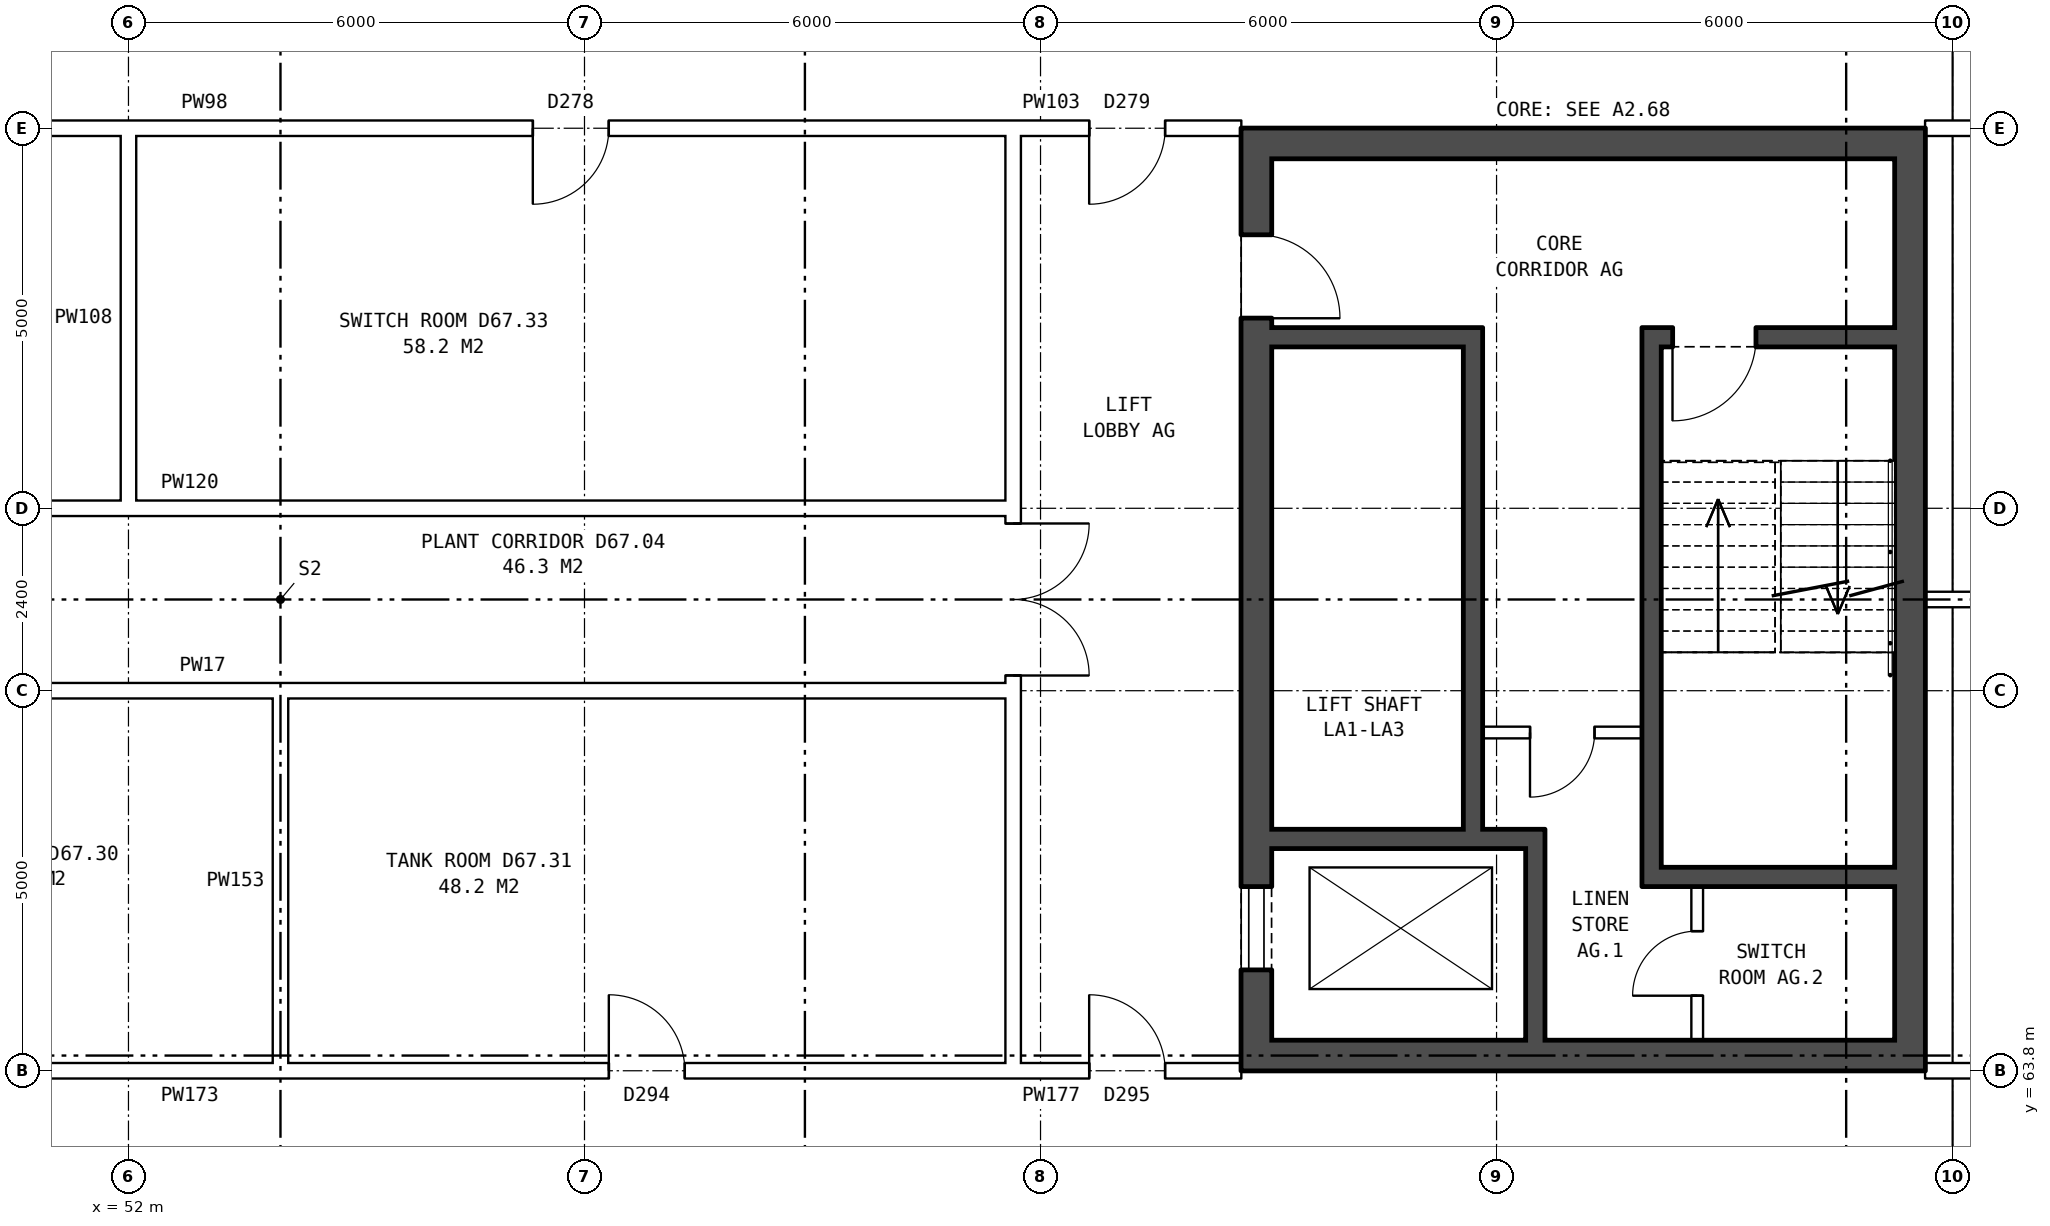
"""IFC4 building model, lengths in metres.
Left out: names, types, materials, properties, quantities, classifications, styles, units other than length and angle.
Written with IfcOpenShell. Run it as: python <this file> out.ifc"""

import sys

from ifc_helpers import new_model, si_unit, direction, frame, frame_2d, origin, place, context, subcontext, project, spatial, rectangle, extrude, element, fill, save


model = new_model("IFC4")
c1 = context("Model", 3, precision=1e-05, world=origin(), true_north=direction((0.0, 1.0)))
c2 = subcontext(c1, "Body", "Model", "MODEL_VIEW")
j1 = project(units=[si_unit("LENGTHUNIT", "METRE"), si_unit("PLANEANGLEUNIT", "RADIAN")], contexts=[c1])
p1 = place(None, origin())
s1 = spatial("IfcSite", under=j1, at=p1, CompositionType="ELEMENT")
p2 = place(p1, origin())
s2 = spatial("IfcBuilding", under=s1, at=p2, CompositionType="ELEMENT")
p3 = place(p2, frame((0.0, 0.0, 236.9)))
s3 = spatial("IfcBuildingStorey", under=s2, at=p3, CompositionType="ELEMENT", Elevation=236.9)
p4 = place(p3, frame((66.84, 63.8, 0.0), z_axis=(0.0, 0.0, 1.0), x_axis=(0.0, 1.0, 0.0)))
e1 = element("IfcWall", 1, at=p4, inside=s3, PredefinedType="SHEAR", context=c2, shape_type="SweptSolid", body=[
    extrude(rectangle(XDim=12.4, YDim=0.4, at=frame_2d((6.2, 0.0))), origin(), (0.0, 0.0, 1.0), 6.7),
])
p5 = place(p4, frame((1.325, 0.0, 0.0)))
e2 = element("IfcOpeningElement", 2, at=p5, cuts=e1, PredefinedType="OPENING", context=c2, shape_type="SweptSolid", body=[
    extrude(rectangle(XDim=1.1, YDim=2.1, at=frame_2d((0.55, 1.05))), frame((0.0, 0.21, 0.0), z_axis=(0.0, -1.0, 0.0), x_axis=(1.0, 0.0, 0.0)), (0.0, 0.0, 1.0), 0.42),
])
p6 = place(p4, frame((9.9, 0.0, 0.0)))
e3 = element("IfcOpeningElement", 3, at=p6, cuts=e1, PredefinedType="OPENING", context=c2, shape_type="SweptSolid", body=[
    extrude(rectangle(XDim=1.1, YDim=2.1, at=frame_2d((0.55, 1.05))), frame((0.0, 0.21, 0.0), z_axis=(0.0, -1.0, 0.0), x_axis=(1.0, 0.0, 0.0)), (0.0, 0.0, 1.0), 0.42),
])
p7 = place(p3, frame((75.44, 63.8, 0.0), z_axis=(0.0, 0.0, 1.0), x_axis=(0.0, 1.0, 0.0)))
e4 = element("IfcWall", 4, at=p7, inside=s3, PredefinedType="SHEAR", context=c2, shape_type="SweptSolid", body=[
    extrude(rectangle(XDim=12.4, YDim=0.4, at=frame_2d((6.2, 0.0))), origin(), (0.0, 0.0, 1.0), 6.7),
])
for number, where, z_axis, x_axis in (
    (5, (67.04, 64.0, 0.0), (0.0, 0.0, 1.0), (1.0, 0.0, 0.0)),
    (6, (67.04, 76.0, 0.0), (0.0, 0.0, 1.0), (1.0, 0.0, 0.0)),
):
    element("IfcWall", number, at=place(p3, frame(where, z_axis=z_axis, x_axis=x_axis)), inside=s3, PredefinedType="SHEAR", context=c2, shape_type="SweptSolid", body=[
        extrude(rectangle(XDim=8.2, YDim=0.4, at=frame_2d((4.1, 0.0))), origin(), (0.0, 0.0, 1.0), 6.7),
    ])
p8 = place(p3, frame((72.165, 66.35, 0.0), z_axis=(0.0, 0.0, 1.0), x_axis=(1.0, 0.0, 0.0)))
e7 = element("IfcWall", 7, at=p8, inside=s3, PredefinedType="SHEAR", context=c2, shape_type="SweptSolid", body=[
    extrude(rectangle(XDim=3.075, YDim=0.25, at=frame_2d((1.538, 0.0))), origin(), (0.0, 0.0, 1.0), 6.7),
])
p9 = place(p3, frame((67.04, 66.85, 0.0), z_axis=(0.0, 0.0, 1.0), x_axis=(1.0, 0.0, 0.0)))
e8 = element("IfcWall", 8, at=p9, inside=s3, PredefinedType="SHEAR", context=c2, shape_type="SweptSolid", body=[
    extrude(rectangle(XDim=3.595, YDim=0.25, at=frame_2d((1.797, 0.0))), origin(), (0.0, 0.0, 1.0), 6.7),
])
p10 = place(p3, frame((69.815, 68.25, 0.0), z_axis=(0.0, 0.0, 1.0), x_axis=(1.0, 0.0, 0.0)))
e9 = element("IfcWall", 9, at=p10, inside=s3, PredefinedType="PARTITIONING", context=c2, shape_type="SweptSolid", body=[
    extrude(rectangle(XDim=2.1, YDim=0.15, at=frame_2d((1.05, 0.0))), origin(), (0.0, 0.0, 1.0), 6.7),
])
p11 = place(p10, frame((0.625, 0.0, 0.0)))
e10 = element("IfcOpeningElement", 10, at=p11, cuts=e9, PredefinedType="OPENING", context=c2, shape_type="SweptSolid", body=[
    extrude(rectangle(XDim=0.85, YDim=2.1, at=frame_2d((0.425, 1.05))), frame((0.0, 0.085, 0.0), z_axis=(0.0, -1.0, 0.0), x_axis=(1.0, 0.0, 0.0)), (0.0, 0.0, 1.0), 0.17),
])
p12 = place(p3, frame((67.04, 73.45, 0.0), z_axis=(0.0, 0.0, 1.0), x_axis=(1.0, 0.0, 0.0)))
e11 = element("IfcWall", 11, at=p12, inside=s3, PredefinedType="SHEAR", context=c2, shape_type="SweptSolid", body=[
    extrude(rectangle(XDim=2.525, YDim=0.25, at=frame_2d((1.262, 0.0))), origin(), (0.0, 0.0, 1.0), 6.7),
])
p13 = place(p3, frame((72.165, 73.45, 0.0), z_axis=(0.0, 0.0, 1.0), x_axis=(1.0, 0.0, 0.0)))
e12 = element("IfcWall", 12, at=p13, inside=s3, PredefinedType="SHEAR", context=c2, shape_type="SweptSolid", body=[
    extrude(rectangle(XDim=3.075, YDim=0.25, at=frame_2d((1.538, 0.0))), origin(), (0.0, 0.0, 1.0), 6.7),
])
p14 = place(p13, frame((0.15, 0.0, 0.0)))
e13 = element("IfcOpeningElement", 13, at=p14, cuts=e12, PredefinedType="OPENING", context=c2, shape_type="SweptSolid", body=[
    extrude(rectangle(XDim=1.1, YDim=2.1, at=frame_2d((0.55, 1.05))), frame((0.0, 0.135, 0.0), z_axis=(0.0, -1.0, 0.0), x_axis=(1.0, 0.0, 0.0)), (0.0, 0.0, 1.0), 0.27),
])
p15 = place(p3, frame((69.69, 66.975, 0.0), z_axis=(0.0, 0.0, 1.0), x_axis=(0.0, 1.0, 0.0)))
e14 = element("IfcWall", 14, at=p15, inside=s3, PredefinedType="SHEAR", context=c2, shape_type="SweptSolid", body=[
    extrude(rectangle(XDim=6.6, YDim=0.25, at=frame_2d((3.3, 0.0))), origin(), (0.0, 0.0, 1.0), 6.7),
])
p16 = place(p3, frame((70.51, 64.2, 0.0), z_axis=(0.0, 0.0, 1.0), x_axis=(0.0, 1.0, 0.0)))
e15 = element("IfcWall", 15, at=p16, inside=s3, PredefinedType="SHEAR", context=c2, shape_type="SweptSolid", body=[
    extrude(rectangle(XDim=2.525, YDim=0.25, at=frame_2d((1.263, 0.0))), origin(), (0.0, 0.0, 1.0), 6.7),
])
p17 = place(p3, frame((72.04, 66.225, 0.0), z_axis=(0.0, 0.0, 1.0), x_axis=(0.0, 1.0, 0.0)))
e16 = element("IfcWall", 16, at=p17, inside=s3, PredefinedType="SHEAR", context=c2, shape_type="SweptSolid", body=[
    extrude(rectangle(XDim=7.35, YDim=0.25, at=frame_2d((3.675, 0.0))), origin(), (0.0, 0.0, 1.0), 6.7),
])
p18 = place(p3, frame((72.64, 64.2, 0.0), z_axis=(0.0, 0.0, 1.0), x_axis=(0.0, 1.0, 0.0)))
e17 = element("IfcWall", 17, at=p18, inside=s3, PredefinedType="PARTITIONING", context=c2, shape_type="SweptSolid", body=[
    extrude(rectangle(XDim=2.025, YDim=0.15, at=frame_2d((1.013, 0.0))), origin(), (0.0, 0.0, 1.0), 6.7),
])
p19 = place(p18, frame((0.587, 0.0, 0.0)))
e18 = element("IfcOpeningElement", 18, at=p19, cuts=e17, PredefinedType="OPENING", context=c2, shape_type="SweptSolid", body=[
    extrude(rectangle(XDim=0.85, YDim=2.1, at=frame_2d((0.425, 1.05))), frame((0.0, 0.085, 0.0), z_axis=(0.0, -1.0, 0.0), x_axis=(1.0, 0.0, 0.0)), (0.0, 0.0, 1.0), 0.17),
])
p20 = place(p3, frame((63.64, 63.9, 0.0), z_axis=(0.0, 0.0, 1.0), x_axis=(0.0, 1.0, 0.0)))
e19 = element("IfcWall", 19, at=p20, inside=s3, PredefinedType="PARTITIONING", context=c2, shape_type="SweptSolid", body=[
    extrude(rectangle(XDim=12.2, YDim=0.2, at=frame_2d((6.1, 0.0))), origin(), (0.0, 0.0, 1.0), 6.7),
])
p21 = place(p20, frame((5.1, 0.0, 0.0)))
e20 = element("IfcOpeningElement", 20, at=p21, cuts=e19, PredefinedType="OPENING", context=c2, shape_type="SweptSolid", body=[
    extrude(rectangle(XDim=2.0, YDim=2.1, at=frame_2d((1.0, 1.05))), frame((0.0, 0.11, 0.0), z_axis=(0.0, -1.0, 0.0), x_axis=(1.0, 0.0, 0.0)), (0.0, 0.0, 1.0), 0.22),
])
p22 = place(p3, frame((44.36, 63.8, 0.0), z_axis=(0.0, 0.0, 1.0), x_axis=(1.0, 0.0, 0.0)))
e21 = element("IfcWall", 21, at=p22, inside=s3, PredefinedType="PARTITIONING", context=c2, shape_type="SweptSolid", body=[
    extrude(rectangle(XDim=19.28, YDim=0.2, at=frame_2d((9.64, 0.0))), origin(), (0.0, 0.0, 1.0), 6.7),
])
p23 = place(p22, frame((4.32, 0.0, 0.0)))
e22 = element("IfcOpeningElement", 22, at=p23, cuts=e21, PredefinedType="OPENING", context=c2, shape_type="SweptSolid", body=[
    extrude(rectangle(XDim=1.0, YDim=2.1, at=frame_2d((0.5, 1.05))), frame((0.0, 0.11, 0.0), z_axis=(0.0, -1.0, 0.0), x_axis=(1.0, 0.0, 0.0)), (0.0, 0.0, 1.0), 0.22),
])
p24 = place(p22, frame((13.96, 0.0, 0.0)))
e23 = element("IfcOpeningElement", 23, at=p24, cuts=e21, PredefinedType="OPENING", context=c2, shape_type="SweptSolid", body=[
    extrude(rectangle(XDim=1.0, YDim=2.1, at=frame_2d((0.5, 1.05))), frame((0.0, 0.11, 0.0), z_axis=(0.0, -1.0, 0.0), x_axis=(1.0, 0.0, 0.0)), (0.0, 0.0, 1.0), 0.22),
])
p25 = place(p3, frame((75.64, 63.8, 0.0), z_axis=(0.0, 0.0, 1.0), x_axis=(1.0, 0.0, 0.0)))
e24 = element("IfcWall", 24, at=p25, inside=s3, PredefinedType="PARTITIONING", context=c2, shape_type="SweptSolid", body=[
    extrude(rectangle(XDim=21.085, YDim=0.2, at=frame_2d((10.542, 0.0))), origin(), (0.0, 0.0, 1.0), 6.7),
])
p26 = place(p25, frame((9.992, 0.0, 0.0)))
e25 = element("IfcOpeningElement", 25, at=p26, cuts=e24, PredefinedType="OPENING", context=c2, shape_type="SweptSolid", body=[
    extrude(rectangle(XDim=1.0, YDim=2.1, at=frame_2d((0.5, 1.05))), frame((0.0, 0.11, 0.0), z_axis=(0.0, -1.0, 0.0), x_axis=(1.0, 0.0, 0.0)), (0.0, 0.0, 1.0), 0.22),
])
p27 = place(p3, frame((63.64, 63.8, 0.0), z_axis=(0.0, 0.0, 1.0), x_axis=(1.0, 0.0, 0.0)))
e26 = element("IfcWall", 26, at=p27, inside=s3, PredefinedType="PARTITIONING", context=c2, shape_type="SweptSolid", body=[
    extrude(rectangle(XDim=3.0, YDim=0.2, at=frame_2d((1.5, 0.0))), origin(), (0.0, 0.0, 1.0), 6.7),
])
p28 = place(p27, frame((1.0, 0.0, 0.0)))
e27 = element("IfcOpeningElement", 27, at=p28, cuts=e26, PredefinedType="OPENING", context=c2, shape_type="SweptSolid", body=[
    extrude(rectangle(XDim=1.0, YDim=2.1, at=frame_2d((0.5, 1.05))), frame((0.0, 0.11, 0.0), z_axis=(0.0, -1.0, 0.0), x_axis=(1.0, 0.0, 0.0)), (0.0, 0.0, 1.0), 0.22),
])
p29 = place(p3, frame((44.36, 68.8, 0.0), z_axis=(0.0, 0.0, 1.0), x_axis=(1.0, 0.0, 0.0)))
e28 = element("IfcWall", 28, at=p29, inside=s3, PredefinedType="PARTITIONING", context=c2, shape_type="SweptSolid", body=[
    extrude(rectangle(XDim=19.28, YDim=0.2, at=frame_2d((9.64, 0.0))), origin(), (0.0, 0.0, 1.0), 6.7),
])
p30 = place(p3, frame((75.64, 70.0, 0.0), z_axis=(0.0, 0.0, 1.0), x_axis=(1.0, 0.0, 0.0)))
e29 = element("IfcWall", 29, at=p30, inside=s3, PredefinedType="PARTITIONING", context=c2, shape_type="SweptSolid", body=[
    extrude(rectangle(XDim=21.085, YDim=0.2, at=frame_2d((10.542, 0.0))), origin(), (0.0, 0.0, 1.0), 6.7),
])
p31 = place(p3, frame((44.36, 71.2, 0.0), z_axis=(0.0, 0.0, 1.0), x_axis=(1.0, 0.0, 0.0)))
e30 = element("IfcWall", 30, at=p31, inside=s3, PredefinedType="PARTITIONING", context=c2, shape_type="SweptSolid", body=[
    extrude(rectangle(XDim=19.28, YDim=0.2, at=frame_2d((9.64, 0.0))), origin(), (0.0, 0.0, 1.0), 6.7),
])
p32 = place(p3, frame((44.36, 76.2, 0.0), z_axis=(0.0, 0.0, 1.0), x_axis=(1.0, 0.0, 0.0)))
e31 = element("IfcWall", 31, at=p32, inside=s3, PredefinedType="PARTITIONING", context=c2, shape_type="SweptSolid", body=[
    extrude(rectangle(XDim=19.28, YDim=0.2, at=frame_2d((9.64, 0.0))), origin(), (0.0, 0.0, 1.0), 6.7),
])
p33 = place(p32, frame((3.32, 0.0, 0.0)))
e32 = element("IfcOpeningElement", 32, at=p33, cuts=e31, PredefinedType="OPENING", context=c2, shape_type="SweptSolid", body=[
    extrude(rectangle(XDim=1.0, YDim=2.1, at=frame_2d((0.5, 1.05))), frame((0.0, 0.11, 0.0), z_axis=(0.0, -1.0, 0.0), x_axis=(1.0, 0.0, 0.0)), (0.0, 0.0, 1.0), 0.22),
])
p34 = place(p32, frame((12.96, 0.0, 0.0)))
e33 = element("IfcOpeningElement", 33, at=p34, cuts=e31, PredefinedType="OPENING", context=c2, shape_type="SweptSolid", body=[
    extrude(rectangle(XDim=1.0, YDim=2.1, at=frame_2d((0.5, 1.05))), frame((0.0, 0.11, 0.0), z_axis=(0.0, -1.0, 0.0), x_axis=(1.0, 0.0, 0.0)), (0.0, 0.0, 1.0), 0.22),
])
p35 = place(p3, frame((75.64, 76.2, 0.0), z_axis=(0.0, 0.0, 1.0), x_axis=(1.0, 0.0, 0.0)))
e34 = element("IfcWall", 34, at=p35, inside=s3, PredefinedType="PARTITIONING", context=c2, shape_type="SweptSolid", body=[
    extrude(rectangle(XDim=21.085, YDim=0.2, at=frame_2d((10.542, 0.0))), origin(), (0.0, 0.0, 1.0), 6.7),
])
p36 = place(p35, frame((9.992, 0.0, 0.0)))
e35 = element("IfcOpeningElement", 35, at=p36, cuts=e34, PredefinedType="OPENING", context=c2, shape_type="SweptSolid", body=[
    extrude(rectangle(XDim=1.0, YDim=2.1, at=frame_2d((0.5, 1.05))), frame((0.0, 0.11, 0.0), z_axis=(0.0, -1.0, 0.0), x_axis=(1.0, 0.0, 0.0)), (0.0, 0.0, 1.0), 0.22),
])
p37 = place(p3, frame((63.64, 76.2, 0.0), z_axis=(0.0, 0.0, 1.0), x_axis=(1.0, 0.0, 0.0)))
e36 = element("IfcWall", 36, at=p37, inside=s3, PredefinedType="PARTITIONING", context=c2, shape_type="SweptSolid", body=[
    extrude(rectangle(XDim=3.0, YDim=0.2, at=frame_2d((1.5, 0.0))), origin(), (0.0, 0.0, 1.0), 6.7),
])
p38 = place(p37, frame((1.0, 0.0, 0.0)))
e37 = element("IfcOpeningElement", 37, at=p38, cuts=e36, PredefinedType="OPENING", context=c2, shape_type="SweptSolid", body=[
    extrude(rectangle(XDim=1.0, YDim=2.1, at=frame_2d((0.5, 1.05))), frame((0.0, 0.11, 0.0), z_axis=(0.0, -1.0, 0.0), x_axis=(1.0, 0.0, 0.0)), (0.0, 0.0, 1.0), 0.22),
])
for number, where, z_axis, x_axis in (
    (38, (52.0, 71.1, 0.0), (0.0, 0.0, 1.0), (0.0, 1.0, 0.0)),
    (39, (54.0, 63.7, 0.0), (0.0, 0.0, 1.0), (0.0, 1.0, 0.0)),
):
    element("IfcWall", number, at=place(p3, frame(where, z_axis=z_axis, x_axis=x_axis)), inside=s3, PredefinedType="PARTITIONING", context=c2, shape_type="SweptSolid", body=[
        extrude(rectangle(XDim=5.2, YDim=0.2, at=frame_2d((2.6, 0.0))), origin(), (0.0, 0.0, 1.0), 6.7),
    ])
p39 = place(p5, origin())
e40 = element("IfcDoor", 40, at=p39, inside=s3, OperationType="DOUBLE_DOOR_SLIDING", PredefinedType="DOOR", context=c2, shape_type="SweptSolid", body=[
    extrude(rectangle(XDim=1.1, YDim=2.1, at=frame_2d((0.55, 1.05))), frame((0.0, -0.135, 0.0), z_axis=(0.0, -1.0, 0.0), x_axis=(1.0, 0.0, 0.0)), (0.0, 0.0, 1.0), 0.05),
])
fill(e2, e40)
p40 = place(p6, frame((1.1, 0.0, 0.0), z_axis=(0.0, 0.0, 1.0), x_axis=(-1.0, 0.0, 0.0)))
e41 = element("IfcDoor", 41, at=p40, inside=s3, OperationType="SINGLE_SWING_RIGHT", PredefinedType="DOOR", context=c2, shape_type="SweptSolid", body=[
    extrude(rectangle(XDim=1.1, YDim=2.1, at=frame_2d((0.55, 1.05))), frame((0.0, 0.185, 0.0), z_axis=(0.0, -1.0, 0.0), x_axis=(1.0, 0.0, 0.0)), (0.0, 0.0, 1.0), 0.05),
])
fill(e3, e41)
p41 = place(p14, frame((1.1, 0.0, 0.0), z_axis=(0.0, 0.0, 1.0), x_axis=(-1.0, 0.0, 0.0)))
e42 = element("IfcDoor", 42, at=p41, inside=s3, OperationType="SINGLE_SWING_RIGHT", PredefinedType="DOOR", context=c2, shape_type="SweptSolid", body=[
    extrude(rectangle(XDim=1.1, YDim=2.1, at=frame_2d((0.55, 1.05))), frame((0.0, 0.025, 0.0), z_axis=(0.0, -1.0, 0.0), x_axis=(1.0, 0.0, 0.0)), (0.0, 0.0, 1.0), 0.05),
])
fill(e13, e42)
p42 = place(p11, frame((0.85, 0.0, 0.0), z_axis=(0.0, 0.0, 1.0), x_axis=(-1.0, 0.0, 0.0)))
e43 = element("IfcDoor", 43, at=p42, inside=s3, OperationType="SINGLE_SWING_RIGHT", PredefinedType="DOOR", context=c2, shape_type="SweptSolid", body=[
    extrude(rectangle(XDim=0.85, YDim=2.1, at=frame_2d((0.425, 1.05))), frame((0.0, 0.025, 0.0), z_axis=(0.0, -1.0, 0.0), x_axis=(1.0, 0.0, 0.0)), (0.0, 0.0, 1.0), 0.05),
])
fill(e10, e43)
p43 = place(p19, origin())
e44 = element("IfcDoor", 44, at=p43, inside=s3, OperationType="SINGLE_SWING_LEFT", PredefinedType="DOOR", context=c2, shape_type="SweptSolid", body=[
    extrude(rectangle(XDim=0.85, YDim=2.1, at=frame_2d((0.425, 1.05))), frame((0.0, 0.025, 0.0), z_axis=(0.0, -1.0, 0.0), x_axis=(1.0, 0.0, 0.0)), (0.0, 0.0, 1.0), 0.05),
])
fill(e18, e44)
p44 = place(p21, frame((2.0, 0.0, 0.0), z_axis=(0.0, 0.0, 1.0), x_axis=(-1.0, 0.0, 0.0)))
e45 = element("IfcDoor", 45, at=p44, inside=s3, OperationType="DOUBLE_DOOR_SINGLE_SWING", PredefinedType="DOOR", context=c2, shape_type="SweptSolid", body=[
    extrude(rectangle(XDim=2.0, YDim=2.1, at=frame_2d((1.0, 1.05))), frame((0.0, 0.025, 0.0), z_axis=(0.0, -1.0, 0.0), x_axis=(1.0, 0.0, 0.0)), (0.0, 0.0, 1.0), 0.05),
])
fill(e20, e45)
p45 = place(p24, origin())
e46 = element("IfcDoor", 46, at=p45, inside=s3, OperationType="SINGLE_SWING_LEFT", PredefinedType="DOOR", context=c2, shape_type="SweptSolid", body=[
    extrude(rectangle(XDim=1.0, YDim=2.1, at=frame_2d((0.5, 1.05))), frame((0.0, 0.025, 0.0), z_axis=(0.0, -1.0, 0.0), x_axis=(1.0, 0.0, 0.0)), (0.0, 0.0, 1.0), 0.05),
])
fill(e23, e46)
p46 = place(p28, origin())
e47 = element("IfcDoor", 47, at=p46, inside=s3, OperationType="SINGLE_SWING_LEFT", PredefinedType="DOOR", context=c2, shape_type="SweptSolid", body=[
    extrude(rectangle(XDim=1.0, YDim=2.1, at=frame_2d((0.5, 1.05))), frame((0.0, 0.025, 0.0), z_axis=(0.0, -1.0, 0.0), x_axis=(1.0, 0.0, 0.0)), (0.0, 0.0, 1.0), 0.05),
])
fill(e27, e47)
p47 = place(p34, frame((1.0, 0.0, 0.0), z_axis=(0.0, 0.0, 1.0), x_axis=(-1.0, 0.0, 0.0)))
e48 = element("IfcDoor", 48, at=p47, inside=s3, OperationType="SINGLE_SWING_RIGHT", PredefinedType="DOOR", context=c2, shape_type="SweptSolid", body=[
    extrude(rectangle(XDim=1.0, YDim=2.1, at=frame_2d((0.5, 1.05))), frame((0.0, 0.025, 0.0), z_axis=(0.0, -1.0, 0.0), x_axis=(1.0, 0.0, 0.0)), (0.0, 0.0, 1.0), 0.05),
])
fill(e33, e48)
p48 = place(p38, frame((1.0, 0.0, 0.0), z_axis=(0.0, 0.0, 1.0), x_axis=(-1.0, 0.0, 0.0)))
e49 = element("IfcDoor", 49, at=p48, inside=s3, OperationType="SINGLE_SWING_RIGHT", PredefinedType="DOOR", context=c2, shape_type="SweptSolid", body=[
    extrude(rectangle(XDim=1.0, YDim=2.1, at=frame_2d((0.5, 1.05))), frame((0.0, 0.025, 0.0), z_axis=(0.0, -1.0, 0.0), x_axis=(1.0, 0.0, 0.0)), (0.0, 0.0, 1.0), 0.05),
])
fill(e37, e49)
save(model, sys.argv[1])
